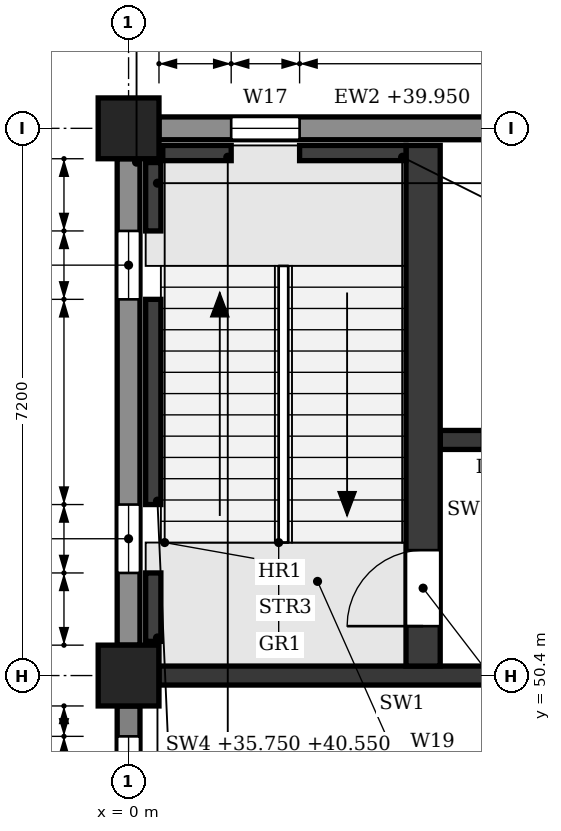
"""IFC4 building model, lengths in metres.
Left out: names, types, materials, properties, quantities, classifications, styles, units other than length and angle.
Written with IfcOpenShell. Run it as: python <this file> out.ifc"""

import sys

from ifc_helpers import new_model, si_unit, direction, frame, frame_2d, origin, origin_2d, place, context, subcontext, project, spatial, polyline, rectangle, outline, extrude, element, fill, save


model = new_model("IFC4")
c1 = context("Model", 3, precision=1e-05, world=origin(), true_north=direction((0.0, 1.0)))
c2 = subcontext(c1, "Body", "Model", "MODEL_VIEW")
j1 = project(units=[si_unit("LENGTHUNIT", "METRE"), si_unit("PLANEANGLEUNIT", "RADIAN")], contexts=[c1])
p1 = place(None, origin())
s1 = spatial("IfcSite", under=j1, at=p1, CompositionType="ELEMENT")
p2 = place(p1, origin())
s2 = spatial("IfcBuilding", under=s1, at=p2, CompositionType="ELEMENT")
p3 = place(p2, frame((0.0, 0.0, 36.0)))
s3 = spatial("IfcBuildingStorey", under=s2, at=p3, CompositionType="ELEMENT", Elevation=36.0)
for number, where, z_axis, x_axis in (
    (1, (0.0, 50.4, 0.0), (0.0, 0.0, 1.0), (1.0, 0.0, 0.0)),
    (2, (0.0, 57.6, 0.0), (0.0, 0.0, 1.0), (1.0, 0.0, 0.0)),
):
    element("IfcColumn", number, at=place(p3, frame(where, z_axis=z_axis, x_axis=x_axis)), inside=s3, PredefinedType="COLUMN", context=c2, shape_type="SweptSolid", body=[
        extrude(rectangle(XDim=0.8, YDim=0.8, at=origin_2d()), origin(), (0.0, 0.0, 1.0), 4.8),
    ])
p4 = place(p3, frame((0.0, 43.6, 0.0), z_axis=(0.0, 0.0, 1.0), x_axis=(0.0, 1.0, 0.0)))
e3 = element("IfcWall", 3, at=p4, inside=s3, PredefinedType="STANDARD", context=c2, shape_type="SweptSolid", body=[
    extrude(rectangle(XDim=6.4, YDim=0.3, at=frame_2d((3.2, 0.0))), origin(), (0.0, 0.0, 1.0), 3.95),
])
p5 = place(p4, frame((0.4, 0.0, 0.9)))
e4 = element("IfcOpeningElement", 4, at=p5, cuts=e3, PredefinedType="OPENING", context=c2, shape_type="SweptSolid", body=[
    extrude(outline(polyline([(0.0, 0.0), (0.85, 0.0), (0.85, 2.55), (0.425, 3.0), (0.0, 2.55), (0.0, 0.0)])), frame((0.0, 0.16, 0.0), z_axis=(0.0, -1.0, 0.0), x_axis=(1.0, 0.0, 0.0)), (0.0, 0.0, 1.0), 0.32),
])
p6 = place(p4, frame((1.55, 0.0, 0.9)))
e5 = element("IfcOpeningElement", 5, at=p6, cuts=e3, PredefinedType="OPENING", context=c2, shape_type="SweptSolid", body=[
    extrude(outline(polyline([(0.0, 0.0), (0.85, 0.0), (0.85, 2.55), (0.425, 3.0), (0.0, 2.55), (0.0, 0.0)])), frame((0.0, 0.16, 0.0), z_axis=(0.0, -1.0, 0.0), x_axis=(1.0, 0.0, 0.0)), (0.0, 0.0, 1.0), 0.32),
])
p7 = place(p4, frame((4.0, 0.0, 0.9)))
e6 = element("IfcOpeningElement", 6, at=p7, cuts=e3, PredefinedType="OPENING", context=c2, shape_type="SweptSolid", body=[
    extrude(outline(polyline([(0.0, 0.0), (0.85, 0.0), (0.85, 2.55), (0.425, 3.0), (0.0, 2.55), (0.0, 0.0)])), frame((0.0, 0.16, 0.0), z_axis=(0.0, -1.0, 0.0), x_axis=(1.0, 0.0, 0.0)), (0.0, 0.0, 1.0), 0.32),
])
p8 = place(p4, frame((5.15, 0.0, 0.9)))
e7 = element("IfcOpeningElement", 7, at=p8, cuts=e3, PredefinedType="OPENING", context=c2, shape_type="SweptSolid", body=[
    extrude(outline(polyline([(0.0, 0.0), (0.85, 0.0), (0.85, 2.55), (0.425, 3.0), (0.0, 2.55), (0.0, 0.0)])), frame((0.0, 0.16, 0.0), z_axis=(0.0, -1.0, 0.0), x_axis=(1.0, 0.0, 0.0)), (0.0, 0.0, 1.0), 0.32),
])
p9 = place(p3, frame((0.0, 50.8, 0.0), z_axis=(0.0, 0.0, 1.0), x_axis=(0.0, 1.0, 0.0)))
e8 = element("IfcWall", 8, at=p9, inside=s3, PredefinedType="STANDARD", context=c2, shape_type="SweptSolid", body=[
    extrude(rectangle(XDim=6.4, YDim=0.3, at=frame_2d((3.2, 0.0))), origin(), (0.0, 0.0, 1.0), 3.95),
])
p10 = place(p9, frame((0.95, 0.0, 0.9)))
e9 = element("IfcOpeningElement", 9, at=p10, cuts=e8, PredefinedType="OPENING", context=c2, shape_type="SweptSolid", body=[
    extrude(outline(polyline([(0.0, 0.0), (0.9, 0.0), (0.9, 2.55), (0.45, 3.0), (0.0, 2.55), (0.0, 0.0)])), frame((0.0, 0.16, 0.0), z_axis=(0.0, -1.0, 0.0), x_axis=(1.0, 0.0, 0.0)), (0.0, 0.0, 1.0), 0.32),
])
p11 = place(p9, frame((4.55, 0.0, 0.9)))
e10 = element("IfcOpeningElement", 10, at=p11, cuts=e8, PredefinedType="OPENING", context=c2, shape_type="SweptSolid", body=[
    extrude(outline(polyline([(0.0, 0.0), (0.9, 0.0), (0.9, 2.55), (0.45, 3.0), (0.0, 2.55), (0.0, 0.0)])), frame((0.0, 0.16, 0.0), z_axis=(0.0, -1.0, 0.0), x_axis=(1.0, 0.0, 0.0)), (0.0, 0.0, 1.0), 0.32),
])
p12 = place(p3, frame((6.8, 57.6, 0.0), z_axis=(0.0, 0.0, 1.0), x_axis=(-1.0, 0.0, 0.0)))
e11 = element("IfcWall", 11, at=p12, inside=s3, PredefinedType="STANDARD", context=c2, shape_type="SweptSolid", body=[
    extrude(rectangle(XDim=6.4, YDim=0.3, at=frame_2d((3.2, 0.0))), origin(), (0.0, 0.0, 1.0), 3.95),
])
p13 = place(p12, frame((4.55, 0.0, 0.9)))
e12 = element("IfcOpeningElement", 12, at=p13, cuts=e11, PredefinedType="OPENING", context=c2, shape_type="SweptSolid", body=[
    extrude(outline(polyline([(0.0, 0.0), (0.9, 0.0), (0.9, 2.55), (0.45, 3.0), (0.0, 2.55), (0.0, 0.0)])), frame((0.0, 0.16, 0.0), z_axis=(0.0, -1.0, 0.0), x_axis=(1.0, 0.0, 0.0)), (0.0, 0.0, 1.0), 0.32),
])
p14 = place(p3, frame((0.4, 50.4, 0.0), z_axis=(0.0, 0.0, 1.0), x_axis=(1.0, 0.0, 0.0)))
e13 = element("IfcWall", 13, at=p14, inside=s3, PredefinedType="SHEAR", context=c2, shape_type="SweptSolid", body=[
    extrude(rectangle(XDim=6.4, YDim=0.25, at=frame_2d((3.2, 0.0))), origin(), (0.0, 0.0, 1.0), 3.85),
])
p15 = place(p14, frame((4.85, 0.0, 0.0)))
e14 = element("IfcOpeningElement", 14, at=p15, cuts=e13, PredefinedType="OPENING", context=c2, shape_type="SweptSolid", body=[
    extrude(rectangle(XDim=1.1, YDim=2.1, at=frame_2d((0.55, 1.05))), frame((0.0, 0.135, 0.0), z_axis=(0.0, -1.0, 0.0), x_axis=(1.0, 0.0, 0.0)), (0.0, 0.0, 1.0), 0.27),
])
p16 = place(p3, frame((0.325, 50.85, -0.25), z_axis=(0.0, 0.0, 1.0), x_axis=(0.0, 1.0, 0.0)))
e15 = element("IfcWall", 15, at=p16, inside=s3, PredefinedType="SHEAR", context=c2, shape_type="SweptSolid", body=[
    extrude(rectangle(XDim=0.9, YDim=0.2, at=frame_2d((0.45, 0.0))), origin(), (0.0, 0.0, 1.0), 4.8),
])
p17 = place(p3, frame((0.325, 52.65, -0.25), z_axis=(0.0, 0.0, 1.0), x_axis=(0.0, 1.0, 0.0)))
e16 = element("IfcWall", 16, at=p17, inside=s3, PredefinedType="SHEAR", context=c2, shape_type="SweptSolid", body=[
    extrude(rectangle(XDim=2.7, YDim=0.2, at=frame_2d((1.35, 0.0))), origin(), (0.0, 0.0, 1.0), 4.8),
])
p18 = place(p3, frame((0.325, 56.25, -0.25), z_axis=(0.0, 0.0, 1.0), x_axis=(0.0, 1.0, 0.0)))
e17 = element("IfcWall", 17, at=p18, inside=s3, PredefinedType="SHEAR", context=c2, shape_type="SweptSolid", body=[
    extrude(rectangle(XDim=0.9, YDim=0.2, at=frame_2d((0.45, 0.0))), origin(), (0.0, 0.0, 1.0), 4.8),
])
p19 = place(p3, frame((0.45, 57.275, -0.25), z_axis=(0.0, 0.0, 1.0), x_axis=(1.0, 0.0, 0.0)))
e18 = element("IfcWall", 18, at=p19, inside=s3, PredefinedType="SHEAR", context=c2, shape_type="SweptSolid", body=[
    extrude(rectangle(XDim=0.9, YDim=0.2, at=frame_2d((0.45, 0.0))), origin(), (0.0, 0.0, 1.0), 4.8),
])
p20 = place(p3, frame((2.25, 57.275, -0.25), z_axis=(0.0, 0.0, 1.0), x_axis=(1.0, 0.0, 0.0)))
e19 = element("IfcWall", 19, at=p20, inside=s3, PredefinedType="SHEAR", context=c2, shape_type="SweptSolid", body=[
    extrude(rectangle(XDim=1.4, YDim=0.2, at=frame_2d((0.7, 0.0))), origin(), (0.0, 0.0, 1.0), 4.8),
])
p21 = place(p3, frame((3.875, 50.525, 0.0), z_axis=(0.0, 0.0, 1.0), x_axis=(0.0, 1.0, 0.0)))
e20 = element("IfcWall", 20, at=p21, inside=s3, PredefinedType="SHEAR", context=c2, shape_type="SweptSolid", body=[
    extrude(rectangle(XDim=6.85, YDim=0.45, at=frame_2d((3.425, 0.0))), origin(), (0.0, 0.0, 1.0), 4.55),
])
p22 = place(p21, frame((0.525, 0.0, 0.0)))
e21 = element("IfcOpeningElement", 21, at=p22, cuts=e20, PredefinedType="OPENING", context=c2, shape_type="SweptSolid", body=[
    extrude(rectangle(XDim=1.0, YDim=2.1, at=frame_2d((0.5, 1.05))), frame((0.0, 0.235, 0.0), z_axis=(0.0, -1.0, 0.0), x_axis=(1.0, 0.0, 0.0)), (0.0, 0.0, 1.0), 0.47),
])
p23 = place(p3, frame((4.1, 53.5, 0.0), z_axis=(0.0, 0.0, 1.0), x_axis=(1.0, 0.0, 0.0)))
e22 = element("IfcWall", 22, at=p23, inside=s3, PredefinedType="SHEAR", context=c2, shape_type="SweptSolid", body=[
    extrude(rectangle(XDim=2.975, YDim=0.25, at=frame_2d((1.487, 0.0))), origin(), (0.0, 0.0, 1.0), 4.55),
])
p24 = place(p23, frame((0.55, 0.0, 0.0)))
e23 = element("IfcOpeningElement", 23, at=p24, cuts=e22, PredefinedType="OPENING", context=c2, shape_type="SweptSolid", body=[
    extrude(rectangle(XDim=0.9, YDim=2.1, at=frame_2d((0.45, 1.05))), frame((0.0, 0.135, 0.0), z_axis=(0.0, -1.0, 0.0), x_axis=(1.0, 0.0, 0.0)), (0.0, 0.0, 1.0), 0.27),
])
p25 = place(p13, origin())
e24 = element("IfcWindow", 24, at=p25, inside=s3, PartitioningType="SINGLE_PANEL", PredefinedType="WINDOW", context=c2, shape_type="SweptSolid", body=[
    extrude(outline(polyline([(0.0, 0.0), (0.9, 0.0), (0.9, 2.55), (0.45, 3.0), (0.0, 2.55), (0.0, 0.0)])), frame((0.0, 0.03, 0.0), z_axis=(0.0, -1.0, 0.0), x_axis=(1.0, 0.0, 0.0)), (0.0, 0.0, 1.0), 0.06),
])
fill(e12, e24)
p26 = place(p8, origin())
e25 = element("IfcWindow", 25, at=p26, inside=s3, PartitioningType="SINGLE_PANEL", PredefinedType="WINDOW", context=c2, shape_type="SweptSolid", body=[
    extrude(outline(polyline([(0.0, 0.0), (0.85, 0.0), (0.85, 2.55), (0.425, 3.0), (0.0, 2.55), (0.0, 0.0)])), frame((0.0, 0.03, 0.0), z_axis=(0.0, -1.0, 0.0), x_axis=(1.0, 0.0, 0.0)), (0.0, 0.0, 1.0), 0.06),
])
fill(e7, e25)
p27 = place(p10, origin())
e26 = element("IfcWindow", 26, at=p27, inside=s3, PartitioningType="SINGLE_PANEL", PredefinedType="WINDOW", context=c2, shape_type="SweptSolid", body=[
    extrude(outline(polyline([(0.0, 0.0), (0.9, 0.0), (0.9, 2.55), (0.45, 3.0), (0.0, 2.55), (0.0, 0.0)])), frame((0.0, 0.03, 0.0), z_axis=(0.0, -1.0, 0.0), x_axis=(1.0, 0.0, 0.0)), (0.0, 0.0, 1.0), 0.06),
])
fill(e9, e26)
p28 = place(p11, origin())
e27 = element("IfcWindow", 27, at=p28, inside=s3, PartitioningType="SINGLE_PANEL", PredefinedType="WINDOW", context=c2, shape_type="SweptSolid", body=[
    extrude(outline(polyline([(0.0, 0.0), (0.9, 0.0), (0.9, 2.55), (0.45, 3.0), (0.0, 2.55), (0.0, 0.0)])), frame((0.0, 0.03, 0.0), z_axis=(0.0, -1.0, 0.0), x_axis=(1.0, 0.0, 0.0)), (0.0, 0.0, 1.0), 0.06),
])
fill(e10, e27)
p29 = place(p22, origin())
e28 = element("IfcDoor", 28, at=p29, inside=s3, OperationType="SINGLE_SWING_LEFT", PredefinedType="DOOR", context=c2, shape_type="SweptSolid", body=[
    extrude(rectangle(XDim=1.0, YDim=2.1, at=frame_2d((0.5, 1.05))), frame((0.0, 0.025, 0.0), z_axis=(0.0, -1.0, 0.0), x_axis=(1.0, 0.0, 0.0)), (0.0, 0.0, 1.0), 0.05),
])
fill(e21, e28)
save(model, sys.argv[1])
